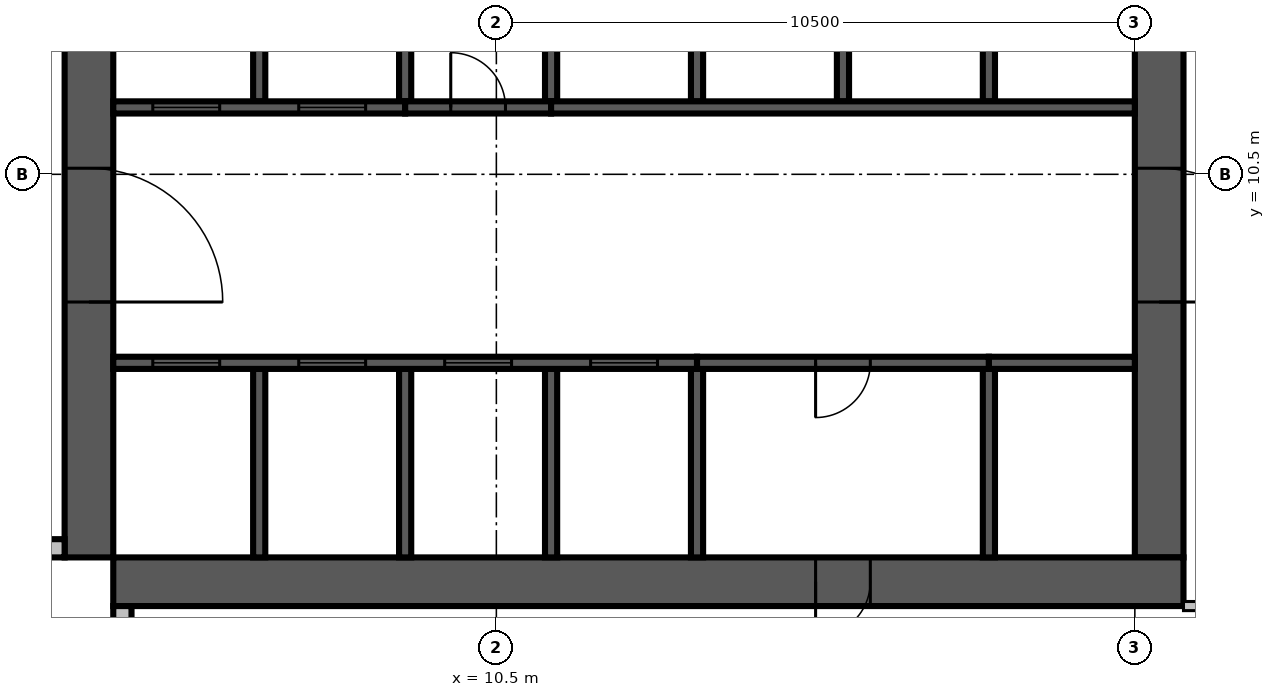
"""IFC4 building model, lengths in metres.
Left out: names, types, materials, properties, quantities, classifications, styles, units other than length and angle.
Written with IfcOpenShell. Run it as: python <this file> out.ifc"""

import sys

from ifc_helpers import new_model, si_unit, direction, frame, frame_2d, origin, place, context, subcontext, project, spatial, rectangle, extrude, source, transform, mapped, element, fill, save


model = new_model("IFC4")
c1 = context("Model", 3, precision=1e-05, world=origin(), true_north=direction((0.0, 1.0)))
c2 = subcontext(c1, "Body", "Model", "MODEL_VIEW")
j1 = project(units=[si_unit("LENGTHUNIT", "METRE"), si_unit("PLANEANGLEUNIT", "RADIAN")], contexts=[c1])
p1 = place(None, origin())
s1 = spatial("IfcSite", under=j1, at=p1, CompositionType="ELEMENT")
p2 = place(p1, origin())
s2 = spatial("IfcBuilding", under=s1, at=p2, CompositionType="ELEMENT")
p3 = place(p2, frame((0.0, 0.0, 231.0)))
s3 = spatial("IfcBuildingStorey", under=s2, at=p3, CompositionType="ELEMENT", Elevation=231.0)
m1 = source(origin(), c2, "Body", "SweptSolid", [
    extrude(rectangle(XDim=17.6, YDim=0.8, at=frame_2d((8.8, 0.0))), origin(), (0.0, 0.0, 1.0), 3.8),
])
p4 = place(p3, frame((3.8, 4.2, 0.0), z_axis=(0.0, 0.0, 1.0), x_axis=(0.0, 1.0, 0.0)))
e1 = element("IfcWall", 1, at=p4, inside=s3, PredefinedType="SHEAR", context=c2, shape_type="MappedRepresentation", body=[
    mapped(m1, transform((0.0, 0.0, 0.0), scale=1.0)),
])
m2 = source(origin(), c2, "Body", "SweptSolid", [
    extrude(rectangle(XDim=2.2, YDim=2.1, at=frame_2d((1.1, 1.05))), frame((0.0, 0.41, 0.0), z_axis=(0.0, -1.0, 0.0), x_axis=(1.0, 0.0, 0.0)), (0.0, 0.0, 1.0), 0.82),
])
p5 = place(p4, frame((4.2, 0.0, 0.0)))
e2 = element("IfcOpeningElement", 2, at=p5, cuts=e1, PredefinedType="OPENING", context=c2, shape_type="MappedRepresentation", body=[
    mapped(m2, transform((0.0, 0.0, 0.0), scale=1.0)),
])
m3 = source(origin(), c2, "Body", "SweptSolid", [
    extrude(rectangle(XDim=0.9, YDim=2.1, at=frame_2d((0.45, 1.05))), frame((0.0, 0.41, 0.0), z_axis=(0.0, -1.0, 0.0), x_axis=(1.0, 0.0, 0.0)), (0.0, 0.0, 1.0), 0.82),
])
p6 = place(p4, frame((10.95, 0.0, 0.0)))
e3 = element("IfcOpeningElement", 3, at=p6, cuts=e1, PredefinedType="OPENING", context=c2, shape_type="MappedRepresentation", body=[
    mapped(m3, transform((0.0, 0.0, 0.0), scale=1.0)),
])
m4 = source(origin(), c2, "Body", "SweptSolid", [
    extrude(rectangle(XDim=16.8, YDim=0.8, at=frame_2d((8.4, 0.0))), origin(), (0.0, 0.0, 1.0), 3.8),
])
p7 = place(p3, frame((21.4, 4.2, 0.0), z_axis=(0.0, 0.0, 1.0), x_axis=(0.0, 1.0, 0.0)))
e4 = element("IfcWall", 4, at=p7, inside=s3, PredefinedType="SHEAR", context=c2, shape_type="MappedRepresentation", body=[
    mapped(m4, transform((0.0, 0.0, 0.0), scale=1.0)),
])
p8 = place(p7, frame((4.2, 0.0, 0.0)))
e5 = element("IfcOpeningElement", 5, at=p8, cuts=e4, PredefinedType="OPENING", context=c2, shape_type="MappedRepresentation", body=[
    mapped(m2, transform((0.0, 0.0, 0.0), scale=1.0)),
])
m5 = source(origin(), c2, "Body", "SweptSolid", [
    extrude(rectangle(XDim=1.2, YDim=2.1, at=frame_2d((0.6, 1.05))), frame((0.0, 0.41, 0.0), z_axis=(0.0, -1.0, 0.0), x_axis=(1.0, 0.0, 0.0)), (0.0, 0.0, 1.0), 0.82),
])
p9 = place(p7, frame((14.7, 0.0, 0.0)))
e6 = element("IfcOpeningElement", 6, at=p9, cuts=e4, PredefinedType="OPENING", context=c2, shape_type="MappedRepresentation", body=[
    mapped(m5, transform((0.0, 0.0, 0.0), scale=1.0)),
])
p10 = place(p3, frame((4.2, 3.8, 0.0), z_axis=(0.0, 0.0, 1.0), x_axis=(1.0, 0.0, 0.0)))
e7 = element("IfcWall", 7, at=p10, inside=s3, PredefinedType="SHEAR", context=c2, shape_type="MappedRepresentation", body=[
    mapped(m1, transform((0.0, 0.0, 0.0), scale=1.0)),
])
p11 = place(p10, frame((11.55, 0.0, 0.0)))
e8 = element("IfcOpeningElement", 8, at=p11, cuts=e7, PredefinedType="OPENING", context=c2, shape_type="MappedRepresentation", body=[
    mapped(m3, transform((0.0, 0.0, 0.0), scale=1.0)),
])
m6 = source(origin(), c2, "Body", "SweptSolid", [
    extrude(rectangle(XDim=3.4, YDim=0.3, at=frame_2d((1.7, 0.0))), origin(), (0.0, 0.0, 1.0), 3.4),
])
p12 = place(p3, frame((0.0, 4.35, 0.0), z_axis=(0.0, 0.0, 1.0), x_axis=(1.0, 0.0, 0.0)))
e9 = element("IfcWall", 9, at=p12, inside=s3, PredefinedType="STANDARD", context=c2, shape_type="MappedRepresentation", body=[
    mapped(m6, transform((0.0, 0.0, 0.0), scale=1.0)),
])
m7 = source(origin(), c2, "Body", "SweptSolid", [
    extrude(rectangle(XDim=1.8, YDim=2.3, at=frame_2d((0.9, 1.15))), frame((0.0, 0.16, 0.0), z_axis=(0.0, -1.0, 0.0), x_axis=(1.0, 0.0, 0.0)), (0.0, 0.0, 1.0), 0.32),
])
p13 = place(p12, frame((1.2, 0.0, 0.6)))
e10 = element("IfcOpeningElement", 10, at=p13, cuts=e9, PredefinedType="OPENING", context=c2, shape_type="MappedRepresentation", body=[
    mapped(m7, transform((0.0, 0.0, 0.0), scale=1.0)),
])
p14 = place(p3, frame((4.35, 3.4, 0.0), z_axis=(0.0, 0.0, 1.0), x_axis=(0.0, -1.0, 0.0)))
e11 = element("IfcWall", 11, at=p14, inside=s3, PredefinedType="STANDARD", context=c2, shape_type="MappedRepresentation", body=[
    mapped(m6, transform((0.0, 0.0, 0.0), scale=1.0)),
])
p15 = place(p14, frame((0.4, 0.0, 0.6)))
e12 = element("IfcOpeningElement", 12, at=p15, cuts=e11, PredefinedType="OPENING", context=c2, shape_type="MappedRepresentation", body=[
    mapped(m7, transform((0.0, 0.0, 0.0), scale=1.0)),
])
m8 = source(origin(), c2, "Body", "SweptSolid", [
    extrude(rectangle(XDim=3.1, YDim=0.2, at=frame_2d((1.55, 0.0))), origin(), (0.0, 0.0, 1.0), 3.8),
])
for number, where, z_axis, x_axis in (
    (13, (6.6, 4.2, 0.0), (0.0, 0.0, 1.0), (0.0, 1.0, 0.0)),
    (14, (9.0, 4.2, 0.0), (0.0, 0.0, 1.0), (0.0, 1.0, 0.0)),
    (15, (11.4, 4.2, 0.0), (0.0, 0.0, 1.0), (0.0, 1.0, 0.0)),
):
    element("IfcWall", number, at=place(p3, frame(where, z_axis=z_axis, x_axis=x_axis)), inside=s3, PredefinedType="SOLIDWALL", context=c2, shape_type="MappedRepresentation", body=[
        mapped(m8, transform((0.0, 0.0, 0.0), scale=1.0)),
    ])
m9 = source(origin(), c2, "Body", "SweptSolid", [
    extrude(rectangle(XDim=3.1, YDim=0.2, at=frame_2d((1.55, 0.0))), origin(), (0.0, 0.0, 1.0), 3.4),
])
for number, where, z_axis, x_axis in (
    (16, (13.8, 4.2, 0.0), (0.0, 0.0, 1.0), (0.0, 1.0, 0.0)),
    (17, (18.6, 4.2, 0.0), (0.0, 0.0, 1.0), (0.0, 1.0, 0.0)),
):
    element("IfcWall", number, at=place(p3, frame(where, z_axis=z_axis, x_axis=x_axis)), inside=s3, PredefinedType="SOLIDWALL", context=c2, shape_type="MappedRepresentation", body=[
        mapped(m9, transform((0.0, 0.0, 0.0), scale=1.0)),
    ])
m10 = source(origin(), c2, "Body", "SweptSolid", [
    extrude(rectangle(XDim=3.0, YDim=0.2, at=frame_2d((1.5, 0.0))), origin(), (0.0, 0.0, 1.0), 3.8),
])
p16 = place(p3, frame((6.6, 11.7, 0.0), z_axis=(0.0, 0.0, 1.0), x_axis=(0.0, 1.0, 0.0)))
e18 = element("IfcWall", 18, at=p16, inside=s3, PredefinedType="SOLIDWALL", context=c2, shape_type="MappedRepresentation", body=[
    mapped(m10, transform((0.0, 0.0, 0.0), scale=1.0)),
])
m11 = source(origin(), c2, "Body", "SweptSolid", [
    extrude(rectangle(XDim=3.0, YDim=0.2, at=frame_2d((1.5, 0.0))), origin(), (0.0, 0.0, 1.0), 3.4),
])
for number, where, z_axis, x_axis in (
    (19, (9.0, 11.7, 0.0), (0.0, 0.0, 1.0), (0.0, 1.0, 0.0)),
    (20, (11.4, 11.7, 0.0), (0.0, 0.0, 1.0), (0.0, 1.0, 0.0)),
):
    element("IfcWall", number, at=place(p3, frame(where, z_axis=z_axis, x_axis=x_axis)), inside=s3, PredefinedType="SOLIDWALL", context=c2, shape_type="MappedRepresentation", body=[
        mapped(m11, transform((0.0, 0.0, 0.0), scale=1.0)),
    ])
for number, where, z_axis, x_axis in (
    (21, (13.8, 11.7, 0.0), (0.0, 0.0, 1.0), (0.0, 1.0, 0.0)),
    (22, (16.2, 11.7, 0.0), (0.0, 0.0, 1.0), (0.0, 1.0, 0.0)),
    (23, (18.6, 11.7, 0.0), (0.0, 0.0, 1.0), (0.0, 1.0, 0.0)),
):
    element("IfcWall", number, at=place(p3, frame(where, z_axis=z_axis, x_axis=x_axis)), inside=s3, PredefinedType="SOLIDWALL", context=c2, shape_type="MappedRepresentation", body=[
        mapped(m10, transform((0.0, 0.0, 0.0), scale=1.0)),
    ])
m12 = source(origin(), c2, "Body", "SweptSolid", [
    extrude(rectangle(XDim=9.6, YDim=0.2, at=frame_2d((4.8, 0.0))), origin(), (0.0, 0.0, 1.0), 3.8),
])
p17 = place(p3, frame((4.2, 7.4, 0.0), z_axis=(0.0, 0.0, 1.0), x_axis=(1.0, 0.0, 0.0)))
e24 = element("IfcWall", 24, at=p17, inside=s3, PredefinedType="SOLIDWALL", context=c2, shape_type="MappedRepresentation", body=[
    mapped(m12, transform((0.0, 0.0, 0.0), scale=1.0)),
])
m13 = source(origin(), c2, "Body", "SweptSolid", [
    extrude(rectangle(XDim=1.1, YDim=2.1, at=frame_2d((0.55, 1.05))), frame((0.0, 0.11, 0.0), z_axis=(0.0, -1.0, 0.0), x_axis=(1.0, 0.0, 0.0)), (0.0, 0.0, 1.0), 0.22),
])
p18 = place(p17, frame((0.65, 0.0, 0.0)))
e25 = element("IfcOpeningElement", 25, at=p18, cuts=e24, PredefinedType="OPENING", context=c2, shape_type="MappedRepresentation", body=[
    mapped(m13, transform((0.0, 0.0, 0.0), scale=1.0)),
])
p19 = place(p17, frame((3.05, 0.0, 0.0)))
e26 = element("IfcOpeningElement", 26, at=p19, cuts=e24, PredefinedType="OPENING", context=c2, shape_type="MappedRepresentation", body=[
    mapped(m13, transform((0.0, 0.0, 0.0), scale=1.0)),
])
p20 = place(p17, frame((5.45, 0.0, 0.0)))
e27 = element("IfcOpeningElement", 27, at=p20, cuts=e24, PredefinedType="OPENING", context=c2, shape_type="MappedRepresentation", body=[
    mapped(m13, transform((0.0, 0.0, 0.0), scale=1.0)),
])
p21 = place(p17, frame((7.85, 0.0, 0.0)))
e28 = element("IfcOpeningElement", 28, at=p21, cuts=e24, PredefinedType="OPENING", context=c2, shape_type="MappedRepresentation", body=[
    mapped(m13, transform((0.0, 0.0, 0.0), scale=1.0)),
])
m14 = source(origin(), c2, "Body", "SweptSolid", [
    extrude(rectangle(XDim=4.8, YDim=0.2, at=frame_2d((2.4, 0.0))), origin(), (0.0, 0.0, 1.0), 3.4),
])
p22 = place(p3, frame((13.8, 7.4, 0.0), z_axis=(0.0, 0.0, 1.0), x_axis=(1.0, 0.0, 0.0)))
e29 = element("IfcWall", 29, at=p22, inside=s3, PredefinedType="SOLIDWALL", context=c2, shape_type="MappedRepresentation", body=[
    mapped(m14, transform((0.0, 0.0, 0.0), scale=1.0)),
])
m15 = source(origin(), c2, "Body", "SweptSolid", [
    extrude(rectangle(XDim=0.9, YDim=2.1, at=frame_2d((0.45, 1.05))), frame((0.0, 0.11, 0.0), z_axis=(0.0, -1.0, 0.0), x_axis=(1.0, 0.0, 0.0)), (0.0, 0.0, 1.0), 0.22),
])
p23 = place(p22, frame((1.95, 0.0, 0.0)))
e30 = element("IfcOpeningElement", 30, at=p23, cuts=e29, PredefinedType="OPENING", context=c2, shape_type="MappedRepresentation", body=[
    mapped(m15, transform((0.0, 0.0, 0.0), scale=1.0)),
])
m16 = source(origin(), c2, "Body", "SweptSolid", [
    extrude(rectangle(XDim=2.4, YDim=0.2, at=frame_2d((1.2, 0.0))), origin(), (0.0, 0.0, 1.0), 3.8),
])
p24 = place(p3, frame((18.6, 7.4, 0.0), z_axis=(0.0, 0.0, 1.0), x_axis=(1.0, 0.0, 0.0)))
e31 = element("IfcWall", 31, at=p24, inside=s3, PredefinedType="SOLIDWALL", context=c2, shape_type="MappedRepresentation", body=[
    mapped(m16, transform((0.0, 0.0, 0.0), scale=1.0)),
])
m17 = source(origin(), c2, "Body", "SweptSolid", [
    extrude(rectangle(XDim=4.8, YDim=0.2, at=frame_2d((2.4, 0.0))), origin(), (0.0, 0.0, 1.0), 3.8),
])
p25 = place(p3, frame((4.2, 11.6, 0.0), z_axis=(0.0, 0.0, 1.0), x_axis=(1.0, 0.0, 0.0)))
e32 = element("IfcWall", 32, at=p25, inside=s3, PredefinedType="SOLIDWALL", context=c2, shape_type="MappedRepresentation", body=[
    mapped(m17, transform((0.0, 0.0, 0.0), scale=1.0)),
])
p26 = place(p25, frame((0.65, 0.0, 0.0)))
e33 = element("IfcOpeningElement", 33, at=p26, cuts=e32, PredefinedType="OPENING", context=c2, shape_type="MappedRepresentation", body=[
    mapped(m13, transform((0.0, 0.0, 0.0), scale=1.0)),
])
p27 = place(p25, frame((3.05, 0.0, 0.0)))
e34 = element("IfcOpeningElement", 34, at=p27, cuts=e32, PredefinedType="OPENING", context=c2, shape_type="MappedRepresentation", body=[
    mapped(m13, transform((0.0, 0.0, 0.0), scale=1.0)),
])
m18 = source(origin(), c2, "Body", "SweptSolid", [
    extrude(rectangle(XDim=2.4, YDim=0.2, at=frame_2d((1.2, 0.0))), origin(), (0.0, 0.0, 1.0), 3.4),
])
p28 = place(p3, frame((9.0, 11.6, 0.0), z_axis=(0.0, 0.0, 1.0), x_axis=(1.0, 0.0, 0.0)))
e35 = element("IfcWall", 35, at=p28, inside=s3, PredefinedType="SOLIDWALL", context=c2, shape_type="MappedRepresentation", body=[
    mapped(m18, transform((0.0, 0.0, 0.0), scale=1.0)),
])
p29 = place(p28, frame((0.75, 0.0, 0.0)))
e36 = element("IfcOpeningElement", 36, at=p29, cuts=e35, PredefinedType="OPENING", context=c2, shape_type="MappedRepresentation", body=[
    mapped(m15, transform((0.0, 0.0, 0.0), scale=1.0)),
])
p30 = place(p3, frame((11.4, 11.6, 0.0), z_axis=(0.0, 0.0, 1.0), x_axis=(1.0, 0.0, 0.0)))
e37 = element("IfcWall", 37, at=p30, inside=s3, PredefinedType="SOLIDWALL", context=c2, shape_type="MappedRepresentation", body=[
    mapped(m12, transform((0.0, 0.0, 0.0), scale=1.0)),
])
m19 = source(origin(), c2, "Body", "SweptSolid", [
    extrude(rectangle(XDim=7.525, YDim=0.15, at=frame_2d((3.763, 0.0))), origin(), (0.0, 0.0, 1.0), 3.4),
])
p31 = place(p3, frame((21.8, 3.4, 0.0), z_axis=(0.0, 0.0, 1.0), x_axis=(1.0, 0.0, 0.0)))
e38 = element("IfcWall", 38, at=p31, inside=s3, PredefinedType="PARTITIONING", context=c2, shape_type="MappedRepresentation", body=[
    mapped(m19, transform((0.0, 0.0, 0.0), scale=1.0)),
])
m20 = source(origin(), c2, "Body", "SweptSolid", [
    extrude(rectangle(XDim=1.0, YDim=2.1, at=frame_2d((0.5, 1.05))), frame((0.0, 0.085, 0.0), z_axis=(0.0, -1.0, 0.0), x_axis=(1.0, 0.0, 0.0)), (0.0, 0.0, 1.0), 0.17),
])
p32 = place(p31, frame((3.6, 0.0, 0.0)))
e39 = element("IfcOpeningElement", 39, at=p32, cuts=e38, PredefinedType="OPENING", context=c2, shape_type="MappedRepresentation", body=[
    mapped(m20, transform((0.0, 0.0, 0.0), scale=1.0)),
])
m21 = source(origin(), c2, "Body", "SweptSolid", [
    extrude(rectangle(XDim=0.9, YDim=2.1, at=frame_2d((0.45, 1.05))), frame((0.0, 0.085, 0.0), z_axis=(0.0, -1.0, 0.0), x_axis=(1.0, 0.0, 0.0)), (0.0, 0.0, 1.0), 0.17),
])
p33 = place(p31, frame((2.312, 0.0, 0.0)))
e40 = element("IfcOpeningElement", 40, at=p33, cuts=e38, PredefinedType="OPENING", context=c2, shape_type="MappedRepresentation", body=[
    mapped(m21, transform((0.0, 0.0, 0.0), scale=1.0)),
])
m22 = source(origin(), c2, "Body", "SweptSolid", [
    extrude(rectangle(XDim=1.1, YDim=2.1, at=frame_2d((0.55, 1.05))), frame((0.0, 0.025, 0.0), z_axis=(0.0, -1.0, 0.0), x_axis=(1.0, 0.0, 0.0)), (0.0, 0.0, 1.0), 0.05),
])
p34 = place(p18, origin())
e41 = element("IfcDoor", 41, at=p34, inside=s3, OperationType="SLIDING_TO_LEFT", PredefinedType="DOOR", context=c2, shape_type="MappedRepresentation", body=[
    mapped(m22, transform((0.0, 0.0, 0.0), scale=1.0)),
])
fill(e25, e41)
p35 = place(p19, origin())
e42 = element("IfcDoor", 42, at=p35, inside=s3, OperationType="SLIDING_TO_LEFT", PredefinedType="DOOR", context=c2, shape_type="MappedRepresentation", body=[
    mapped(m22, transform((0.0, 0.0, 0.0), scale=1.0)),
])
fill(e26, e42)
p36 = place(p20, origin())
e43 = element("IfcDoor", 43, at=p36, inside=s3, OperationType="SLIDING_TO_LEFT", PredefinedType="DOOR", context=c2, shape_type="MappedRepresentation", body=[
    mapped(m22, transform((0.0, 0.0, 0.0), scale=1.0)),
])
fill(e27, e43)
p37 = place(p21, origin())
e44 = element("IfcDoor", 44, at=p37, inside=s3, OperationType="SLIDING_TO_LEFT", PredefinedType="DOOR", context=c2, shape_type="MappedRepresentation", body=[
    mapped(m22, transform((0.0, 0.0, 0.0), scale=1.0)),
])
fill(e28, e44)
m23 = source(origin(), c2, "Body", "SweptSolid", [
    extrude(rectangle(XDim=0.9, YDim=2.1, at=frame_2d((0.45, 1.05))), frame((0.0, 0.025, 0.0), z_axis=(0.0, -1.0, 0.0), x_axis=(1.0, 0.0, 0.0)), (0.0, 0.0, 1.0), 0.05),
])
p38 = place(p23, origin())
e45 = element("IfcDoor", 45, at=p38, inside=s3, OperationType="SINGLE_SWING_RIGHT", PredefinedType="DOOR", context=c2, shape_type="MappedRepresentation", body=[
    mapped(m23, transform((0.0, 0.0, 0.0), scale=1.0)),
])
fill(e30, e45)
p39 = place(p26, origin())
e46 = element("IfcDoor", 46, at=p39, inside=s3, OperationType="SLIDING_TO_LEFT", PredefinedType="DOOR", context=c2, shape_type="MappedRepresentation", body=[
    mapped(m22, transform((0.0, 0.0, 0.0), scale=1.0)),
])
fill(e33, e46)
p40 = place(p27, origin())
e47 = element("IfcDoor", 47, at=p40, inside=s3, OperationType="SLIDING_TO_LEFT", PredefinedType="DOOR", context=c2, shape_type="MappedRepresentation", body=[
    mapped(m22, transform((0.0, 0.0, 0.0), scale=1.0)),
])
fill(e34, e47)
p41 = place(p29, origin())
e48 = element("IfcDoor", 48, at=p41, inside=s3, OperationType="SINGLE_SWING_LEFT", PredefinedType="DOOR", context=c2, shape_type="MappedRepresentation", body=[
    mapped(m23, transform((0.0, 0.0, 0.0), scale=1.0)),
])
fill(e36, e48)
m24 = source(origin(), c2, "Body", "SweptSolid", [
    extrude(rectangle(XDim=2.2, YDim=2.1, at=frame_2d((1.1, 1.05))), frame((0.0, 0.025, 0.0), z_axis=(0.0, -1.0, 0.0), x_axis=(1.0, 0.0, 0.0)), (0.0, 0.0, 1.0), 0.05),
])
p42 = place(p8, origin())
e49 = element("IfcDoor", 49, at=p42, inside=s3, OperationType="DOUBLE_DOOR_SINGLE_SWING", PredefinedType="DOOR", context=c2, shape_type="MappedRepresentation", body=[
    mapped(m24, transform((0.0, 0.0, 0.0), scale=1.0)),
])
fill(e5, e49)
p43 = place(p5, origin())
e50 = element("IfcDoor", 50, at=p43, inside=s3, OperationType="DOUBLE_DOOR_SINGLE_SWING", PredefinedType="DOOR", context=c2, shape_type="MappedRepresentation", body=[
    mapped(m24, transform((0.0, 0.0, 0.0), scale=1.0)),
])
fill(e2, e50)
p44 = place(p11, origin())
e51 = element("IfcDoor", 51, at=p44, inside=s3, OperationType="SINGLE_SWING_RIGHT", PredefinedType="DOOR", context=c2, shape_type="MappedRepresentation", body=[
    mapped(m23, transform((0.0, 0.0, 0.0), scale=1.0)),
])
fill(e8, e51)
save(model, sys.argv[1])
